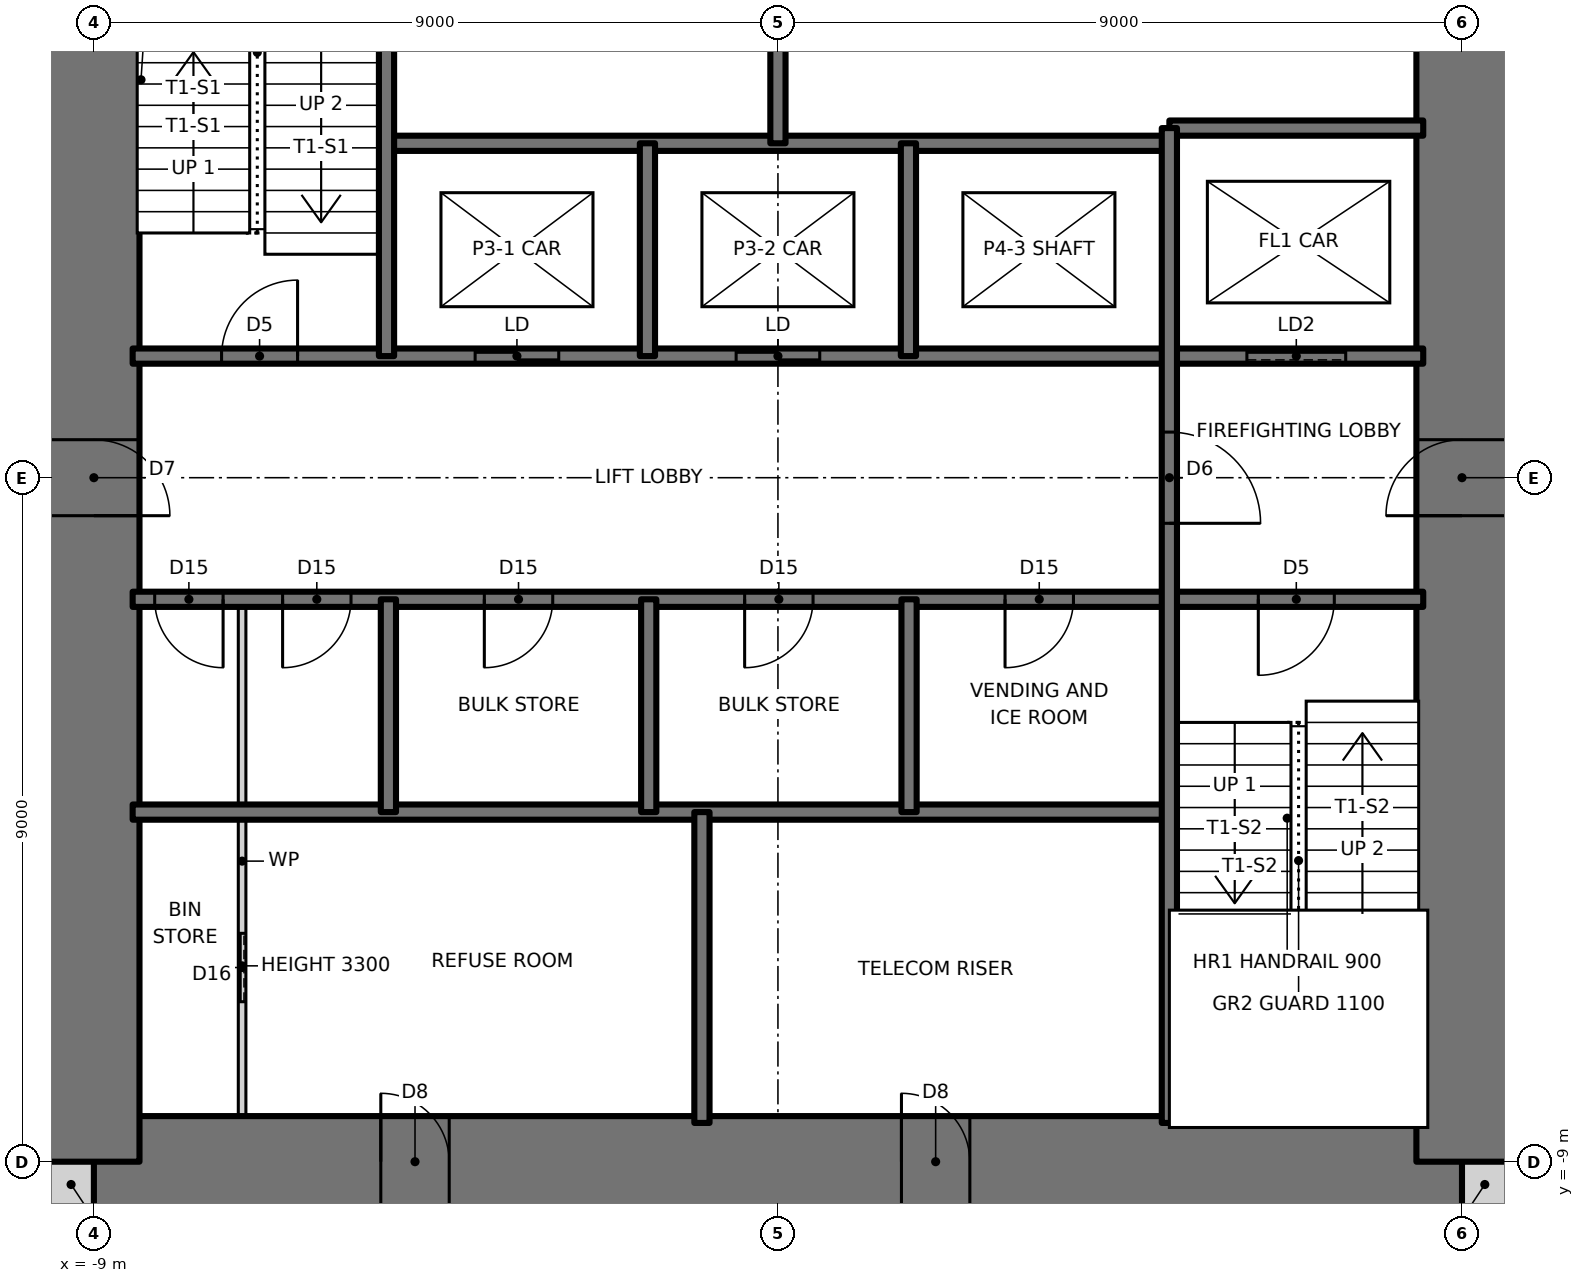
"""IFC4 building model, lengths in metres.
Left out: names, types, materials, properties, quantities, classifications, styles, units other than length and angle.
Written with IfcOpenShell. Run it as: python <this file> out.ifc"""

import sys

from ifc_helpers import new_model, si_unit, direction, frame, frame_2d, origin, place, context, subcontext, project, spatial, rectangle, extrude, element, fill, save


model = new_model("IFC4")
c1 = context("Model", 3, precision=1e-05, world=origin(), true_north=direction((0.0, 1.0)))
c2 = subcontext(c1, "Body", "Model", "MODEL_VIEW")
j1 = project(units=[si_unit("LENGTHUNIT", "METRE"), si_unit("PLANEANGLEUNIT", "RADIAN")], contexts=[c1])
p1 = place(None, origin())
s1 = spatial("IfcSite", under=j1, at=p1, CompositionType="ELEMENT")
p2 = place(p1, origin())
s2 = spatial("IfcBuilding", under=s1, at=p2, CompositionType="ELEMENT")
p3 = place(p2, frame((0.0, 0.0, 153.0)))
s3 = spatial("IfcBuildingStorey", under=s2, at=p3, CompositionType="ELEMENT", Elevation=153.0)
for number, where, z_axis, x_axis in (
    (1, (-9.6, -9.3, 0.0), (0.0, 0.0, 1.0), (1.0, 0.0, 0.0)),
    (2, (9.0, -9.3, 0.0), (0.0, 0.0, 1.0), (1.0, 0.0, 0.0)),
):
    element("IfcWall", number, at=place(p3, frame(where, z_axis=z_axis, x_axis=x_axis)), inside=s3, PredefinedType="SOLIDWALL", context=c2, shape_type="SweptSolid", body=[
        extrude(rectangle(XDim=0.6, YDim=0.6, at=frame_2d((0.3, 0.0))), origin(), (0.0, 0.0, 1.0), 3.5),
    ])
p4 = place(p3, frame((-9.0, -9.0, 0.0), z_axis=(0.0, 0.0, 1.0), x_axis=(1.0, 0.0, 0.0)))
e3 = element("IfcWall", 3, at=p4, inside=s3, PredefinedType="SHEAR", context=c2, shape_type="SweptSolid", body=[
    extrude(rectangle(XDim=18.0, YDim=1.2, at=frame_2d((9.0, 0.0))), origin(), (0.0, 0.0, 1.0), 3.5),
])
p5 = place(p4, frame((3.775, 0.0, 0.0)))
e4 = element("IfcOpeningElement", 4, at=p5, cuts=e3, PredefinedType="OPENING", context=c2, shape_type="SweptSolid", body=[
    extrude(rectangle(XDim=0.9, YDim=2.1, at=frame_2d((0.45, 1.05))), frame((0.0, 0.61, 0.0), z_axis=(0.0, -1.0, 0.0), x_axis=(1.0, 0.0, 0.0)), (0.0, 0.0, 1.0), 1.22),
])
p6 = place(p4, frame((10.625, 0.0, 0.0)))
e5 = element("IfcOpeningElement", 5, at=p6, cuts=e3, PredefinedType="OPENING", context=c2, shape_type="SweptSolid", body=[
    extrude(rectangle(XDim=0.9, YDim=2.1, at=frame_2d((0.45, 1.05))), frame((0.0, 0.61, 0.0), z_axis=(0.0, -1.0, 0.0), x_axis=(1.0, 0.0, 0.0)), (0.0, 0.0, 1.0), 1.22),
])
p7 = place(p3, frame((9.0, -9.0, 0.0), z_axis=(0.0, 0.0, 1.0), x_axis=(0.0, 1.0, 0.0)))
e6 = element("IfcWall", 6, at=p7, inside=s3, PredefinedType="SHEAR", context=c2, shape_type="SweptSolid", body=[
    extrude(rectangle(XDim=18.0, YDim=1.2, at=frame_2d((9.0, 0.0))), origin(), (0.0, 0.0, 1.0), 3.5),
])
p8 = place(p7, frame((8.5, 0.0, 0.0)))
e7 = element("IfcOpeningElement", 7, at=p8, cuts=e6, PredefinedType="OPENING", context=c2, shape_type="SweptSolid", body=[
    extrude(rectangle(XDim=1.0, YDim=2.1, at=frame_2d((0.5, 1.05))), frame((0.0, 0.61, 0.0), z_axis=(0.0, -1.0, 0.0), x_axis=(1.0, 0.0, 0.0)), (0.0, 0.0, 1.0), 1.22),
])
p9 = place(p3, frame((-9.0, 9.0, 0.0), z_axis=(0.0, 0.0, 1.0), x_axis=(0.0, -1.0, 0.0)))
e8 = element("IfcWall", 8, at=p9, inside=s3, PredefinedType="SHEAR", context=c2, shape_type="SweptSolid", body=[
    extrude(rectangle(XDim=18.0, YDim=1.2, at=frame_2d((9.0, 0.0))), origin(), (0.0, 0.0, 1.0), 3.5),
])
p10 = place(p9, frame((8.5, 0.0, 0.0)))
e9 = element("IfcOpeningElement", 9, at=p10, cuts=e8, PredefinedType="OPENING", context=c2, shape_type="SweptSolid", body=[
    extrude(rectangle(XDim=1.0, YDim=2.1, at=frame_2d((0.5, 1.05))), frame((0.0, 0.61, 0.0), z_axis=(0.0, -1.0, 0.0), x_axis=(1.0, 0.0, 0.0)), (0.0, 0.0, 1.0), 1.22),
])
p11 = place(p3, frame((-8.49, -4.4, 0.0), z_axis=(0.0, 0.0, 1.0), x_axis=(1.0, 0.0, 0.0)))
e10 = element("IfcWall", 10, at=p11, inside=s3, PredefinedType="SOLIDWALL", context=c2, shape_type="SweptSolid", body=[
    extrude(rectangle(XDim=13.64, YDim=0.2, at=frame_2d((6.82, 0.0))), origin(), (0.0, 0.0, 1.0), 3.5),
])
p12 = place(p3, frame((-8.49, -1.6, 0.0), z_axis=(0.0, 0.0, 1.0), x_axis=(1.0, 0.0, 0.0)))
e11 = element("IfcWall", 11, at=p12, inside=s3, PredefinedType="SOLIDWALL", context=c2, shape_type="SweptSolid", body=[
    extrude(rectangle(XDim=16.98, YDim=0.2, at=frame_2d((8.49, 0.0))), origin(), (0.0, 0.0, 1.0), 3.5),
])
p13 = place(p12, frame((14.81, 0.0, 0.0)))
e12 = element("IfcOpeningElement", 12, at=p13, cuts=e11, PredefinedType="OPENING", context=c2, shape_type="SweptSolid", body=[
    extrude(rectangle(XDim=1.0, YDim=2.1, at=frame_2d((0.5, 1.05))), frame((0.0, 0.11, 0.0), z_axis=(0.0, -1.0, 0.0), x_axis=(1.0, 0.0, 0.0)), (0.0, 0.0, 1.0), 0.22),
])
p14 = place(p12, frame((1.973, 0.0, 0.0)))
e13 = element("IfcOpeningElement", 13, at=p14, cuts=e11, PredefinedType="OPENING", context=c2, shape_type="SweptSolid", body=[
    extrude(rectangle(XDim=0.9, YDim=2.1, at=frame_2d((0.45, 1.05))), frame((0.0, 0.11, 0.0), z_axis=(0.0, -1.0, 0.0), x_axis=(1.0, 0.0, 0.0)), (0.0, 0.0, 1.0), 0.22),
])
p15 = place(p12, frame((0.29, 0.0, 0.0)))
e14 = element("IfcOpeningElement", 14, at=p15, cuts=e11, PredefinedType="OPENING", context=c2, shape_type="SweptSolid", body=[
    extrude(rectangle(XDim=0.9, YDim=2.1, at=frame_2d((0.45, 1.05))), frame((0.0, 0.11, 0.0), z_axis=(0.0, -1.0, 0.0), x_axis=(1.0, 0.0, 0.0)), (0.0, 0.0, 1.0), 0.22),
])
p16 = place(p12, frame((4.627, 0.0, 0.0)))
e15 = element("IfcOpeningElement", 15, at=p16, cuts=e11, PredefinedType="OPENING", context=c2, shape_type="SweptSolid", body=[
    extrude(rectangle(XDim=0.9, YDim=2.1, at=frame_2d((0.45, 1.05))), frame((0.0, 0.11, 0.0), z_axis=(0.0, -1.0, 0.0), x_axis=(1.0, 0.0, 0.0)), (0.0, 0.0, 1.0), 0.22),
])
p17 = place(p12, frame((8.052, 0.0, 0.0)))
e16 = element("IfcOpeningElement", 16, at=p17, cuts=e11, PredefinedType="OPENING", context=c2, shape_type="SweptSolid", body=[
    extrude(rectangle(XDim=0.9, YDim=2.1, at=frame_2d((0.45, 1.05))), frame((0.0, 0.11, 0.0), z_axis=(0.0, -1.0, 0.0), x_axis=(1.0, 0.0, 0.0)), (0.0, 0.0, 1.0), 0.22),
])
p18 = place(p12, frame((11.478, 0.0, 0.0)))
e17 = element("IfcOpeningElement", 17, at=p18, cuts=e11, PredefinedType="OPENING", context=c2, shape_type="SweptSolid", body=[
    extrude(rectangle(XDim=0.9, YDim=2.1, at=frame_2d((0.45, 1.05))), frame((0.0, 0.11, 0.0), z_axis=(0.0, -1.0, 0.0), x_axis=(1.0, 0.0, 0.0)), (0.0, 0.0, 1.0), 0.22),
])
p19 = place(p3, frame((-8.49, 1.6, 0.0), z_axis=(0.0, 0.0, 1.0), x_axis=(1.0, 0.0, 0.0)))
e18 = element("IfcWall", 18, at=p19, inside=s3, PredefinedType="SOLIDWALL", context=c2, shape_type="SweptSolid", body=[
    extrude(rectangle(XDim=16.98, YDim=0.2, at=frame_2d((8.49, 0.0))), origin(), (0.0, 0.0, 1.0), 3.5),
])
p20 = place(p19, frame((1.17, 0.0, 0.0)))
e19 = element("IfcOpeningElement", 19, at=p20, cuts=e18, PredefinedType="OPENING", context=c2, shape_type="SweptSolid", body=[
    extrude(rectangle(XDim=1.0, YDim=2.1, at=frame_2d((0.5, 1.05))), frame((0.0, 0.11, 0.0), z_axis=(0.0, -1.0, 0.0), x_axis=(1.0, 0.0, 0.0)), (0.0, 0.0, 1.0), 0.22),
])
p21 = place(p19, frame((4.506, 0.0, 0.0)))
e20 = element("IfcOpeningElement", 20, at=p21, cuts=e18, PredefinedType="OPENING", context=c2, shape_type="SweptSolid", body=[
    extrude(rectangle(XDim=1.1, YDim=2.1, at=frame_2d((0.55, 1.05))), frame((0.0, 0.11, 0.0), z_axis=(0.0, -1.0, 0.0), x_axis=(1.0, 0.0, 0.0)), (0.0, 0.0, 1.0), 0.22),
])
p22 = place(p19, frame((7.94, 0.0, 0.0)))
e21 = element("IfcOpeningElement", 21, at=p22, cuts=e18, PredefinedType="OPENING", context=c2, shape_type="SweptSolid", body=[
    extrude(rectangle(XDim=1.1, YDim=2.1, at=frame_2d((0.55, 1.05))), frame((0.0, 0.11, 0.0), z_axis=(0.0, -1.0, 0.0), x_axis=(1.0, 0.0, 0.0)), (0.0, 0.0, 1.0), 0.22),
])
p23 = place(p19, frame((14.66, 0.0, 0.0)))
e22 = element("IfcOpeningElement", 22, at=p23, cuts=e18, PredefinedType="OPENING", context=c2, shape_type="SweptSolid", body=[
    extrude(rectangle(XDim=1.3, YDim=2.1, at=frame_2d((0.65, 1.05))), frame((0.0, 0.11, 0.0), z_axis=(0.0, -1.0, 0.0), x_axis=(1.0, 0.0, 0.0)), (0.0, 0.0, 1.0), 0.22),
])
p24 = place(p3, frame((-5.15, 4.4, 0.0), z_axis=(0.0, 0.0, 1.0), x_axis=(1.0, 0.0, 0.0)))
e23 = element("IfcWall", 23, at=p24, inside=s3, PredefinedType="SOLIDWALL", context=c2, shape_type="SweptSolid", body=[
    extrude(rectangle(XDim=10.3, YDim=0.2, at=frame_2d((5.15, 0.0))), origin(), (0.0, 0.0, 1.0), 3.5),
])
p25 = place(p3, frame((5.15, 4.6, 0.0), z_axis=(0.0, 0.0, 1.0), x_axis=(1.0, 0.0, 0.0)))
e24 = element("IfcWall", 24, at=p25, inside=s3, PredefinedType="SOLIDWALL", context=c2, shape_type="SweptSolid", body=[
    extrude(rectangle(XDim=3.34, YDim=0.2, at=frame_2d((1.67, 0.0))), origin(), (0.0, 0.0, 1.0), 3.5),
])
p26 = place(p3, frame((5.15, -8.49, 0.0), z_axis=(0.0, 0.0, 1.0), x_axis=(0.0, 1.0, 0.0)))
e25 = element("IfcWall", 25, at=p26, inside=s3, PredefinedType="SOLIDWALL", context=c2, shape_type="SweptSolid", body=[
    extrude(rectangle(XDim=13.09, YDim=0.2, at=frame_2d((6.545, 0.0))), origin(), (0.0, 0.0, 1.0), 3.5),
])
p27 = place(p26, frame((7.89, 0.0, 0.0)))
e26 = element("IfcOpeningElement", 26, at=p27, cuts=e25, PredefinedType="OPENING", context=c2, shape_type="SweptSolid", body=[
    extrude(rectangle(XDim=1.2, YDim=2.1, at=frame_2d((0.6, 1.05))), frame((0.0, 0.11, 0.0), z_axis=(0.0, -1.0, 0.0), x_axis=(1.0, 0.0, 0.0)), (0.0, 0.0, 1.0), 0.22),
])
for number, where, z_axis, x_axis in (
    (27, (1.725, -4.4, 0.0), (0.0, 0.0, 1.0), (0.0, 1.0, 0.0)),
    (28, (1.717, 1.6, 0.0), (0.0, 0.0, 1.0), (0.0, 1.0, 0.0)),
):
    element("IfcWall", number, at=place(p3, frame(where, z_axis=z_axis, x_axis=x_axis)), inside=s3, PredefinedType="SOLIDWALL", context=c2, shape_type="SweptSolid", body=[
        extrude(rectangle(XDim=2.8, YDim=0.2, at=frame_2d((1.4, 0.0))), origin(), (0.0, 0.0, 1.0), 3.5),
    ])
for number, where, z_axis, x_axis in (
    (29, (0.0, 4.4, 0.0), (0.0, 0.0, 1.0), (0.0, 1.0, 0.0)),
    (30, (-1.0, -8.49, 0.0), (0.0, 0.0, 1.0), (0.0, 1.0, 0.0)),
):
    element("IfcWall", number, at=place(p3, frame(where, z_axis=z_axis, x_axis=x_axis)), inside=s3, PredefinedType="SOLIDWALL", context=c2, shape_type="SweptSolid", body=[
        extrude(rectangle(XDim=4.09, YDim=0.2, at=frame_2d((2.045, 0.0))), origin(), (0.0, 0.0, 1.0), 3.5),
    ])
for number, where, z_axis, x_axis in (
    (31, (-1.7, -4.4, 0.0), (0.0, 0.0, 1.0), (0.0, 1.0, 0.0)),
    (32, (-1.717, 1.6, 0.0), (0.0, 0.0, 1.0), (0.0, 1.0, 0.0)),
    (33, (-5.125, -4.4, 0.0), (0.0, 0.0, 1.0), (0.0, 1.0, 0.0)),
):
    element("IfcWall", number, at=place(p3, frame(where, z_axis=z_axis, x_axis=x_axis)), inside=s3, PredefinedType="SOLIDWALL", context=c2, shape_type="SweptSolid", body=[
        extrude(rectangle(XDim=2.8, YDim=0.2, at=frame_2d((1.4, 0.0))), origin(), (0.0, 0.0, 1.0), 3.5),
    ])
p28 = place(p3, frame((-5.15, 1.6, 0.0), z_axis=(0.0, 0.0, 1.0), x_axis=(0.0, 1.0, 0.0)))
e34 = element("IfcWall", 34, at=p28, inside=s3, PredefinedType="SOLIDWALL", context=c2, shape_type="SweptSolid", body=[
    extrude(rectangle(XDim=6.89, YDim=0.2, at=frame_2d((3.445, 0.0))), origin(), (0.0, 0.0, 1.0), 3.5),
])
p29 = place(p3, frame((-7.05, -8.49, 0.0), z_axis=(0.0, 0.0, 1.0), x_axis=(0.0, 1.0, 0.0)))
e35 = element("IfcWall", 35, at=p29, inside=s3, PredefinedType="PARTITIONING", context=c2, shape_type="SweptSolid", body=[
    extrude(rectangle(XDim=6.89, YDim=0.1, at=frame_2d((3.445, 0.0))), origin(), (0.0, 0.0, 1.0), 3.3),
])
p30 = place(p29, frame((1.595, 0.0, 0.0)))
e36 = element("IfcOpeningElement", 36, at=p30, cuts=e35, PredefinedType="OPENING", context=c2, shape_type="SweptSolid", body=[
    extrude(rectangle(XDim=0.9, YDim=2.1, at=frame_2d((0.45, 1.05))), frame((0.0, 0.06, 0.0), z_axis=(0.0, -1.0, 0.0), x_axis=(1.0, 0.0, 0.0)), (0.0, 0.0, 1.0), 0.12),
])
p31 = place(p20, origin())
e37 = element("IfcDoor", 37, at=p31, inside=s3, OperationType="SINGLE_SWING_RIGHT", PredefinedType="DOOR", context=c2, shape_type="SweptSolid", body=[
    extrude(rectangle(XDim=1.0, YDim=2.1, at=frame_2d((0.5, 1.05))), frame((0.0, 0.025, 0.0), z_axis=(0.0, -1.0, 0.0), x_axis=(1.0, 0.0, 0.0)), (0.0, 0.0, 1.0), 0.05),
])
fill(e19, e37)
p32 = place(p13, frame((1.0, 0.0, 0.0), z_axis=(0.0, 0.0, 1.0), x_axis=(-1.0, 0.0, 0.0)))
e38 = element("IfcDoor", 38, at=p32, inside=s3, OperationType="SINGLE_SWING_RIGHT", PredefinedType="DOOR", context=c2, shape_type="SweptSolid", body=[
    extrude(rectangle(XDim=1.0, YDim=2.1, at=frame_2d((0.5, 1.05))), frame((0.0, 0.025, 0.0), z_axis=(0.0, -1.0, 0.0), x_axis=(1.0, 0.0, 0.0)), (0.0, 0.0, 1.0), 0.05),
])
fill(e12, e38)
p33 = place(p27, frame((1.2, 0.0, 0.0), z_axis=(0.0, 0.0, 1.0), x_axis=(-1.0, 0.0, 0.0)))
e39 = element("IfcDoor", 39, at=p33, inside=s3, OperationType="SINGLE_SWING_RIGHT", PredefinedType="DOOR", context=c2, shape_type="SweptSolid", body=[
    extrude(rectangle(XDim=1.2, YDim=2.1, at=frame_2d((0.6, 1.05))), frame((0.0, 0.025, 0.0), z_axis=(0.0, -1.0, 0.0), x_axis=(1.0, 0.0, 0.0)), (0.0, 0.0, 1.0), 0.05),
])
fill(e26, e39)
p34 = place(p14, frame((0.9, 0.0, 0.0), z_axis=(0.0, 0.0, 1.0), x_axis=(-1.0, 0.0, 0.0)))
e40 = element("IfcDoor", 40, at=p34, inside=s3, OperationType="SINGLE_SWING_RIGHT", PredefinedType="DOOR", context=c2, shape_type="SweptSolid", body=[
    extrude(rectangle(XDim=0.9, YDim=2.1, at=frame_2d((0.45, 1.05))), frame((0.0, 0.025, 0.0), z_axis=(0.0, -1.0, 0.0), x_axis=(1.0, 0.0, 0.0)), (0.0, 0.0, 1.0), 0.05),
])
fill(e13, e40)
p35 = place(p15, frame((0.9, 0.0, 0.0), z_axis=(0.0, 0.0, 1.0), x_axis=(-1.0, 0.0, 0.0)))
e41 = element("IfcDoor", 41, at=p35, inside=s3, OperationType="SINGLE_SWING_LEFT", PredefinedType="DOOR", context=c2, shape_type="SweptSolid", body=[
    extrude(rectangle(XDim=0.9, YDim=2.1, at=frame_2d((0.45, 1.05))), frame((0.0, 0.025, 0.0), z_axis=(0.0, -1.0, 0.0), x_axis=(1.0, 0.0, 0.0)), (0.0, 0.0, 1.0), 0.05),
])
fill(e14, e41)
p36 = place(p16, frame((0.9, 0.0, 0.0), z_axis=(0.0, 0.0, 1.0), x_axis=(-1.0, 0.0, 0.0)))
e42 = element("IfcDoor", 42, at=p36, inside=s3, OperationType="SINGLE_SWING_RIGHT", PredefinedType="DOOR", context=c2, shape_type="SweptSolid", body=[
    extrude(rectangle(XDim=0.9, YDim=2.1, at=frame_2d((0.45, 1.05))), frame((0.0, 0.025, 0.0), z_axis=(0.0, -1.0, 0.0), x_axis=(1.0, 0.0, 0.0)), (0.0, 0.0, 1.0), 0.05),
])
fill(e15, e42)
p37 = place(p17, frame((0.9, 0.0, 0.0), z_axis=(0.0, 0.0, 1.0), x_axis=(-1.0, 0.0, 0.0)))
e43 = element("IfcDoor", 43, at=p37, inside=s3, OperationType="SINGLE_SWING_RIGHT", PredefinedType="DOOR", context=c2, shape_type="SweptSolid", body=[
    extrude(rectangle(XDim=0.9, YDim=2.1, at=frame_2d((0.45, 1.05))), frame((0.0, 0.025, 0.0), z_axis=(0.0, -1.0, 0.0), x_axis=(1.0, 0.0, 0.0)), (0.0, 0.0, 1.0), 0.05),
])
fill(e16, e43)
p38 = place(p18, frame((0.9, 0.0, 0.0), z_axis=(0.0, 0.0, 1.0), x_axis=(-1.0, 0.0, 0.0)))
e44 = element("IfcDoor", 44, at=p38, inside=s3, OperationType="SINGLE_SWING_RIGHT", PredefinedType="DOOR", context=c2, shape_type="SweptSolid", body=[
    extrude(rectangle(XDim=0.9, YDim=2.1, at=frame_2d((0.45, 1.05))), frame((0.0, 0.025, 0.0), z_axis=(0.0, -1.0, 0.0), x_axis=(1.0, 0.0, 0.0)), (0.0, 0.0, 1.0), 0.05),
])
fill(e17, e44)
p39 = place(p30, origin())
e45 = element("IfcDoor", 45, at=p39, inside=s3, OperationType="SLIDING_TO_RIGHT", PredefinedType="DOOR", context=c2, shape_type="SweptSolid", body=[
    extrude(rectangle(XDim=0.9, YDim=2.1, at=frame_2d((0.45, 1.05))), frame((0.0, 0.025, 0.0), z_axis=(0.0, -1.0, 0.0), x_axis=(1.0, 0.0, 0.0)), (0.0, 0.0, 1.0), 0.05),
])
fill(e36, e45)
p40 = place(p10, origin())
e46 = element("IfcDoor", 46, at=p40, inside=s3, OperationType="SINGLE_SWING_RIGHT", PredefinedType="DOOR", context=c2, shape_type="SweptSolid", body=[
    extrude(rectangle(XDim=1.0, YDim=2.1, at=frame_2d((0.5, 1.05))), frame((0.0, 0.025, 0.0), z_axis=(0.0, -1.0, 0.0), x_axis=(1.0, 0.0, 0.0)), (0.0, 0.0, 1.0), 0.05),
])
fill(e9, e46)
p41 = place(p8, origin())
e47 = element("IfcDoor", 47, at=p41, inside=s3, OperationType="SINGLE_SWING_LEFT", PredefinedType="DOOR", context=c2, shape_type="SweptSolid", body=[
    extrude(rectangle(XDim=1.0, YDim=2.1, at=frame_2d((0.5, 1.05))), frame((0.0, 0.025, 0.0), z_axis=(0.0, -1.0, 0.0), x_axis=(1.0, 0.0, 0.0)), (0.0, 0.0, 1.0), 0.05),
])
fill(e7, e47)
p42 = place(p5, origin())
e48 = element("IfcDoor", 48, at=p42, inside=s3, OperationType="SINGLE_SWING_LEFT", PredefinedType="DOOR", context=c2, shape_type="SweptSolid", body=[
    extrude(rectangle(XDim=0.9, YDim=2.1, at=frame_2d((0.45, 1.05))), frame((0.0, 0.025, 0.0), z_axis=(0.0, -1.0, 0.0), x_axis=(1.0, 0.0, 0.0)), (0.0, 0.0, 1.0), 0.05),
])
fill(e4, e48)
p43 = place(p6, origin())
e49 = element("IfcDoor", 49, at=p43, inside=s3, OperationType="SINGLE_SWING_LEFT", PredefinedType="DOOR", context=c2, shape_type="SweptSolid", body=[
    extrude(rectangle(XDim=0.9, YDim=2.1, at=frame_2d((0.45, 1.05))), frame((0.0, 0.025, 0.0), z_axis=(0.0, -1.0, 0.0), x_axis=(1.0, 0.0, 0.0)), (0.0, 0.0, 1.0), 0.05),
])
fill(e5, e49)
p44 = place(p21, origin())
e50 = element("IfcDoor", 50, at=p44, inside=s3, OperationType="DOUBLE_DOOR_SLIDING", PredefinedType="DOOR", context=c2, shape_type="SweptSolid", body=[
    extrude(rectangle(XDim=1.1, YDim=2.1, at=frame_2d((0.55, 1.05))), frame((0.0, 0.025, 0.0), z_axis=(0.0, -1.0, 0.0), x_axis=(1.0, 0.0, 0.0)), (0.0, 0.0, 1.0), 0.05),
])
fill(e20, e50)
p45 = place(p22, origin())
e51 = element("IfcDoor", 51, at=p45, inside=s3, OperationType="DOUBLE_DOOR_SLIDING", PredefinedType="DOOR", context=c2, shape_type="SweptSolid", body=[
    extrude(rectangle(XDim=1.1, YDim=2.1, at=frame_2d((0.55, 1.05))), frame((0.0, 0.025, 0.0), z_axis=(0.0, -1.0, 0.0), x_axis=(1.0, 0.0, 0.0)), (0.0, 0.0, 1.0), 0.05),
])
fill(e21, e51)
p46 = place(p23, origin())
e52 = element("IfcDoor", 52, at=p46, inside=s3, OperationType="SLIDING_TO_LEFT", PredefinedType="DOOR", context=c2, shape_type="SweptSolid", body=[
    extrude(rectangle(XDim=1.3, YDim=2.1, at=frame_2d((0.65, 1.05))), frame((0.0, 0.025, 0.0), z_axis=(0.0, -1.0, 0.0), x_axis=(1.0, 0.0, 0.0)), (0.0, 0.0, 1.0), 0.05),
])
fill(e22, e52)
save(model, sys.argv[1])
